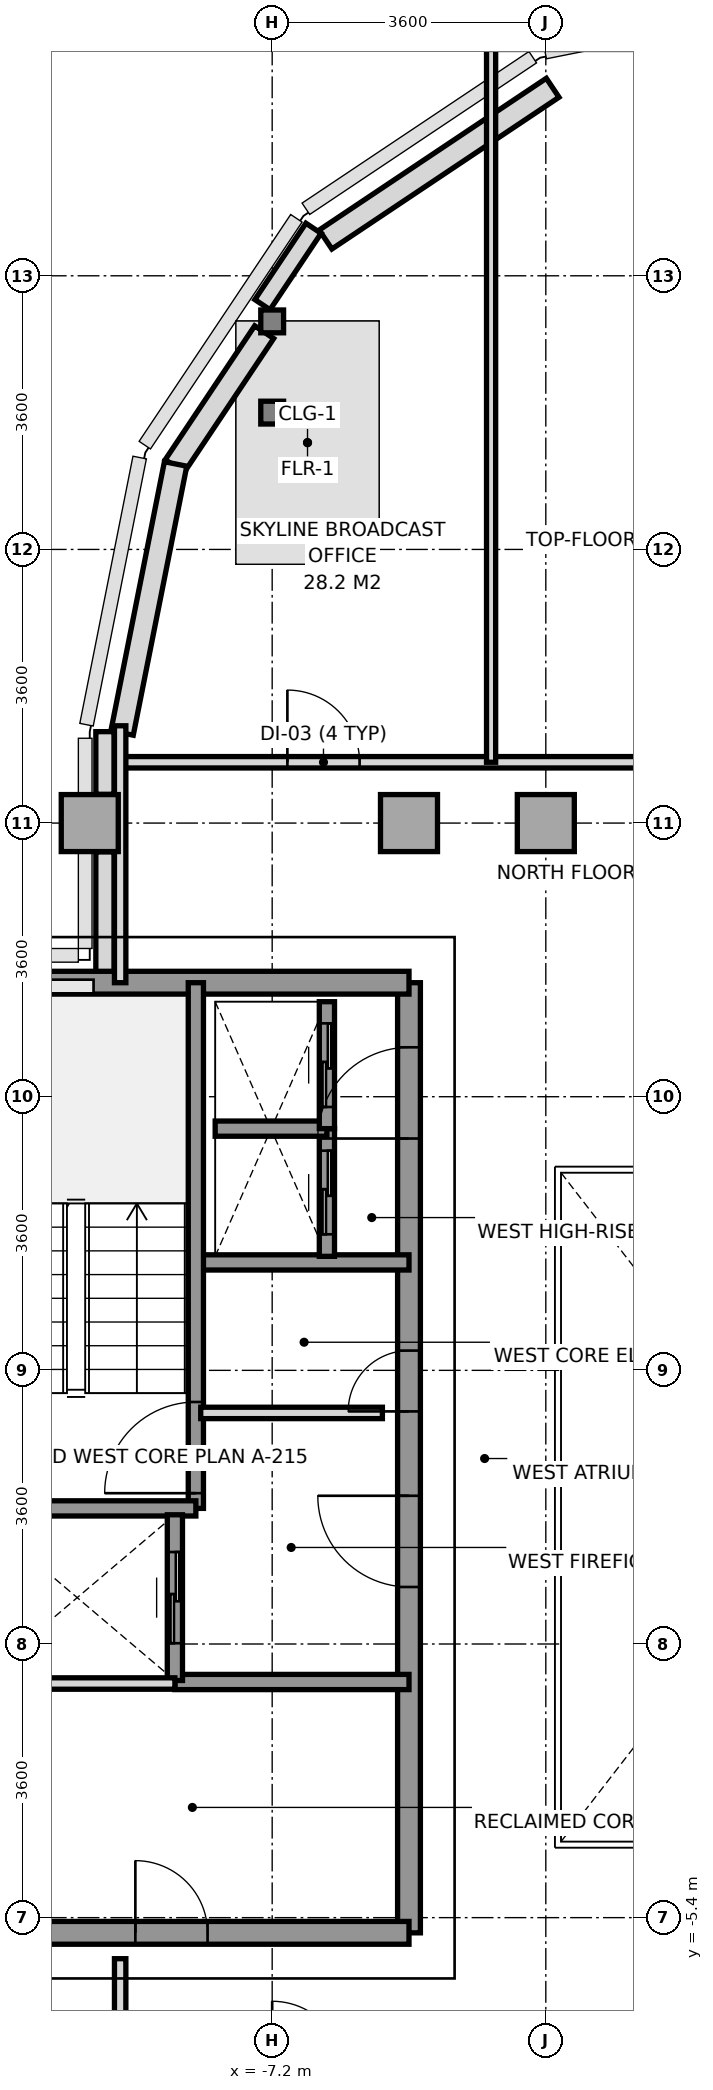
"""IFC4 building model, lengths in metres.
Left out: names, types, materials, properties, quantities, classifications, styles, units other than length and angle.
Written with IfcOpenShell. Run it as: python <this file> out.ifc"""

import sys

from ifc_helpers import new_model, si_unit, direction, frame, frame_2d, origin, origin_2d, place, context, subcontext, project, spatial, rectangle, i_section, extrude, source, transform, mapped, element, fill, save


model = new_model("IFC4")
c1 = context("Model", 3, precision=1e-05, world=origin(), true_north=direction((0.0, 1.0)))
c2 = subcontext(c1, "Body", "Model", "MODEL_VIEW")
j1 = project(units=[si_unit("LENGTHUNIT", "METRE"), si_unit("PLANEANGLEUNIT", "RADIAN")], contexts=[c1])
p1 = place(None, origin())
s1 = spatial("IfcSite", under=j1, at=p1, CompositionType="ELEMENT")
p2 = place(p1, origin())
s2 = spatial("IfcBuilding", under=s1, at=p2, CompositionType="ELEMENT")
p3 = place(p2, frame((0.0, 0.0, 268.4)))
s3 = spatial("IfcBuildingStorey", under=s2, at=p3, CompositionType="ELEMENT", Elevation=268.4)
m1 = source(origin(), c2, "Body", "SweptSolid", [
    extrude(rectangle(XDim=0.75, YDim=0.75, at=origin_2d()), origin(), (0.0, 0.0, 1.0), 2.96),
])
p4 = place(p3, frame((-9.6, 9.0, 0.0), z_axis=(0.0, 0.0, 1.0), x_axis=(1.0, 0.0, 0.0)))
e1 = element("IfcColumn", 1, at=p4, inside=s3, PredefinedType="COLUMN", context=c2, shape_type="MappedRepresentation", body=[
    mapped(m1, transform((0.0, 0.0, 0.0), x_axis=(1.0, 0.0, 0.0), y_axis=(0.0, 1.0, 0.0), z_axis=(0.0, 0.0, 1.0), scale=1.0)),
])
m2 = source(origin(), c2, "Body", "SweptSolid", [
    extrude(i_section(OverallWidth=0.3, OverallDepth=0.3, WebThickness=0.011, FlangeThickness=0.019, at=origin_2d()), origin(), (0.0, 0.0, 1.0), 2.96),
])
for number, where, z_axis, x_axis in (
    (2, (-7.2, 14.4, 0.0), (0.0, 0.0, 1.0), (1.0, 0.0, 0.0)),
    (3, (-7.2, 15.6, 0.0), (0.0, 0.0, 1.0), (1.0, 0.0, 0.0)),
):
    element("IfcColumn", number, at=place(p3, frame(where, z_axis=z_axis, x_axis=x_axis)), inside=s3, PredefinedType="COLUMN", context=c2, shape_type="MappedRepresentation", body=[
        mapped(m2, transform((0.0, 0.0, 0.0), x_axis=(1.0, 0.0, 0.0), y_axis=(0.0, 1.0, 0.0), z_axis=(0.0, 0.0, 1.0), scale=1.0)),
    ])
for number, where, z_axis, x_axis in (
    (4, (-5.4, 9.0, 0.0), (0.0, 0.0, 1.0), (1.0, 0.0, 0.0)),
    (5, (-3.6, 9.0, 0.0), (0.0, 0.0, 1.0), (1.0, 0.0, 0.0)),
):
    element("IfcColumn", number, at=place(p3, frame(where, z_axis=z_axis, x_axis=x_axis)), inside=s3, PredefinedType="COLUMN", context=c2, shape_type="MappedRepresentation", body=[
        mapped(m1, transform((0.0, 0.0, 0.0), x_axis=(1.0, 0.0, 0.0), y_axis=(0.0, 1.0, 0.0), z_axis=(0.0, 0.0, 1.0), scale=1.0)),
    ])
p5 = place(p3, frame((-3.51, 18.674, 0.0), z_axis=(0.0, 0.0, 1.0), x_axis=(-0.831443568068, -0.555609208993, 0.0)))
e6 = element("IfcWall", 6, at=p5, inside=s3, PredefinedType="SOLIDWALL", context=c2, shape_type="SweptSolid", body=[
    extrude(rectangle(XDim=3.594, YDim=0.3, at=frame_2d((1.797, 0.0))), origin(), (0.0, 0.0, 1.0), 2.96),
])
p6 = place(p3, frame((-7.305, 15.458, 0.0), z_axis=(0.0, 0.0, 1.0), x_axis=(-0.555604299396, -0.831446848868, 0.0)))
e7 = element("IfcWall", 7, at=p6, inside=s3, PredefinedType="SOLIDWALL", context=c2, shape_type="SweptSolid", body=[
    extrude(rectangle(XDim=2.118, YDim=0.3, at=frame_2d((1.059, 0.0))), origin(), (0.0, 0.0, 1.0), 2.56),
])
p7 = place(p3, frame((-8.471, 13.725, 0.0), z_axis=(0.0, 0.0, 1.0), x_axis=(-0.195114232679, -0.980780523974, 0.0)))
e8 = element("IfcWall", 8, at=p7, inside=s3, PredefinedType="SOLIDWALL", context=c2, shape_type="SweptSolid", body=[
    extrude(rectangle(XDim=3.609, YDim=0.3, at=frame_2d((1.804, 0.0))), origin(), (0.0, 0.0, 1.0), 2.96),
])
p8 = place(p3, frame((-9.4, 6.953, 0.0), z_axis=(0.0, 0.0, 1.0), x_axis=(0.0, 1.0, 0.0)))
e9 = element("IfcWall", 9, at=p8, inside=s3, PredefinedType="PARAPET", context=c2, shape_type="SweptSolid", body=[
    extrude(rectangle(XDim=1.669, YDim=0.24, at=frame_2d((0.834, 0.0))), origin(), (0.0, 0.0, 1.0), 1.15),
])
p9 = place(p3, frame((-9.4, 9.378, 0.0), z_axis=(0.0, 0.0, 1.0), x_axis=(0.0, 1.0, 0.0)))
e10 = element("IfcWall", 10, at=p9, inside=s3, PredefinedType="PARAPET", context=c2, shape_type="SweptSolid", body=[
    extrude(rectangle(XDim=0.825, YDim=0.24, at=frame_2d((0.413, 0.0))), origin(), (0.0, 0.0, 1.0), 1.15),
])
p10 = place(p3, frame((-7.328, 15.82, 0.0), z_axis=(0.0, 0.0, 1.0), x_axis=(0.555585388542, 0.831459485506, 0.0)))
e11 = element("IfcWall", 11, at=p10, inside=s3, PredefinedType="PARAPET", context=c2, shape_type="SweptSolid", body=[
    extrude(rectangle(XDim=1.209, YDim=0.24, at=frame_2d((0.604, 0.0))), origin(), (0.0, 0.0, 1.0), 1.15),
])
p11 = place(p3, frame((-5.4, -5.6, 0.0), z_axis=(0.0, 0.0, 1.0), x_axis=(0.0, 1.0, 0.0)))
e12 = element("IfcWall", 12, at=p11, inside=s3, PredefinedType="SHEAR", context=c2, shape_type="SweptSolid", body=[
    extrude(rectangle(XDim=12.5, YDim=0.3, at=frame_2d((6.25, 0.0))), origin(), (0.0, 0.0, 1.0), 2.96),
])
p12 = place(p11, frame((4.55, 0.0, 0.0)))
e13 = element("IfcOpeningElement", 13, at=p12, cuts=e12, PredefinedType="OPENING", context=c2, shape_type="SweptSolid", body=[
    extrude(rectangle(XDim=1.2, YDim=2.2, at=frame_2d((0.6, 1.1))), frame((0.0, 0.16, 0.0), z_axis=(0.0, -1.0, 0.0), x_axis=(1.0, 0.0, 0.0)), (0.0, 0.0, 1.0), 0.32),
])
p13 = place(p11, frame((10.45, 0.0, 0.0)))
e14 = element("IfcOpeningElement", 14, at=p13, cuts=e12, PredefinedType="OPENING", context=c2, shape_type="SweptSolid", body=[
    extrude(rectangle(XDim=1.2, YDim=2.2, at=frame_2d((0.6, 1.1))), frame((0.0, 0.16, 0.0), z_axis=(0.0, -1.0, 0.0), x_axis=(1.0, 0.0, 0.0)), (0.0, 0.0, 1.0), 0.32),
])
p14 = place(p11, frame((6.86, 0.0, 0.0)))
e15 = element("IfcOpeningElement", 15, at=p14, cuts=e12, PredefinedType="OPENING", context=c2, shape_type="SweptSolid", body=[
    extrude(rectangle(XDim=0.8, YDim=2.1, at=frame_2d((0.4, 1.05))), frame((0.0, 0.16, 0.0), z_axis=(0.0, -1.0, 0.0), x_axis=(1.0, 0.0, 0.0)), (0.0, 0.0, 1.0), 0.32),
])
p15 = place(p3, frame((-11.356, 6.9, 0.0), z_axis=(0.0, 0.0, 1.0), x_axis=(1.0, 0.0, 0.0)))
e16 = element("IfcWall", 16, at=p15, inside=s3, PredefinedType="SHEAR", context=c2, shape_type="SweptSolid", body=[
    extrude(rectangle(XDim=5.956, YDim=0.3, at=frame_2d((2.978, 0.0))), origin(), (0.0, 0.0, 1.0), 2.96),
])
p16 = place(p3, frame((-13.2, -5.6, 0.0), z_axis=(0.0, 0.0, 1.0), x_axis=(1.0, 0.0, 0.0)))
e17 = element("IfcWall", 17, at=p16, inside=s3, PredefinedType="SHEAR", context=c2, shape_type="SweptSolid", body=[
    extrude(rectangle(XDim=7.8, YDim=0.3, at=frame_2d((3.9, 0.0))), origin(), (0.0, 0.0, 1.0), 2.96),
])
p17 = place(p16, frame((0.65, 0.0, 0.0)))
e18 = element("IfcOpeningElement", 18, at=p17, cuts=e17, PredefinedType="OPENING", context=c2, shape_type="SweptSolid", body=[
    extrude(rectangle(XDim=0.8, YDim=2.1, at=frame_2d((0.4, 1.05))), frame((0.0, 0.16, 0.0), z_axis=(0.0, -1.0, 0.0), x_axis=(1.0, 0.0, 0.0)), (0.0, 0.0, 1.0), 0.32),
])
p18 = place(p16, frame((4.2, 0.0, 0.0)))
e19 = element("IfcOpeningElement", 19, at=p18, cuts=e17, PredefinedType="OPENING", context=c2, shape_type="SweptSolid", body=[
    extrude(rectangle(XDim=0.95, YDim=2.15, at=frame_2d((0.475, 1.075))), frame((0.0, 0.16, 0.0), z_axis=(0.0, -1.0, 0.0), x_axis=(1.0, 0.0, 0.0)), (0.0, 0.0, 1.0), 0.32),
])
p19 = place(p3, frame((-8.18, 3.22, 0.0), z_axis=(0.0, 0.0, 1.0), x_axis=(1.0, 0.0, 0.0)))
e20 = element("IfcWall", 20, at=p19, inside=s3, PredefinedType="SOLIDWALL", context=c2, shape_type="SweptSolid", body=[
    extrude(rectangle(XDim=2.78, YDim=0.2, at=frame_2d((1.39, 0.0))), origin(), (0.0, 0.0, 1.0), 2.96),
])
p20 = place(p3, frame((-8.48, -2.3, 0.0), z_axis=(0.0, 0.0, 1.0), x_axis=(1.0, 0.0, 0.0)))
e21 = element("IfcWall", 21, at=p20, inside=s3, PredefinedType="SOLIDWALL", context=c2, shape_type="SweptSolid", body=[
    extrude(rectangle(XDim=3.08, YDim=0.2, at=frame_2d((1.54, 0.0))), origin(), (0.0, 0.0, 1.0), 2.96),
])
p21 = place(p3, frame((-8.204, -0.016, 0.0), z_axis=(0.0, 0.0, 1.0), x_axis=(0.0, 1.0, 0.0)))
e22 = element("IfcWall", 22, at=p21, inside=s3, PredefinedType="SOLIDWALL", context=c2, shape_type="SweptSolid", body=[
    extrude(rectangle(XDim=6.916, YDim=0.2, at=frame_2d((3.458, 0.0))), origin(), (0.0, 0.0, 1.0), 2.96),
])
p22 = place(p21, frame((0.2, 0.0, 0.0)))
e23 = element("IfcOpeningElement", 23, at=p22, cuts=e22, PredefinedType="OPENING", context=c2, shape_type="SweptSolid", body=[
    extrude(rectangle(XDim=1.2, YDim=2.2, at=frame_2d((0.6, 1.1))), frame((0.0, 0.11, 0.0), z_axis=(0.0, -1.0, 0.0), x_axis=(1.0, 0.0, 0.0)), (0.0, 0.0, 1.0), 0.22),
])
p23 = place(p3, frame((-11.356, -0.016, 0.0), z_axis=(0.0, 0.0, 1.0), x_axis=(1.0, 0.0, 0.0)))
e24 = element("IfcWall", 24, at=p23, inside=s3, PredefinedType="SOLIDWALL", context=c2, shape_type="SweptSolid", body=[
    extrude(rectangle(XDim=3.152, YDim=0.2, at=frame_2d((1.576, 0.0))), origin(), (0.0, 0.0, 1.0), 2.96),
])
p24 = place(p3, frame((-8.48, -2.28, 0.0), z_axis=(0.0, 0.0, 1.0), x_axis=(0.0, 1.0, 0.0)))
e25 = element("IfcWall", 25, at=p24, inside=s3, PredefinedType="SOLIDWALL", context=c2, shape_type="SweptSolid", body=[
    extrude(rectangle(XDim=2.18, YDim=0.2, at=frame_2d((1.09, 0.0))), origin(), (0.0, 0.0, 1.0), 2.96),
])
p25 = place(p24, frame((0.49, 0.0, 0.0)))
e26 = element("IfcOpeningElement", 26, at=p25, cuts=e25, PredefinedType="OPENING", context=c2, shape_type="SweptSolid", body=[
    extrude(rectangle(XDim=1.2, YDim=2.2, at=frame_2d((0.6, 1.1))), frame((0.0, 0.11, 0.0), z_axis=(0.0, -1.0, 0.0), x_axis=(1.0, 0.0, 0.0)), (0.0, 0.0, 1.0), 0.22),
])
p26 = place(p3, frame((-6.48, 3.3, 0.0), z_axis=(0.0, 0.0, 1.0), x_axis=(0.0, 1.0, 0.0)))
e27 = element("IfcWall", 27, at=p26, inside=s3, PredefinedType="SOLIDWALL", context=c2, shape_type="SweptSolid", body=[
    extrude(rectangle(XDim=1.68, YDim=0.2, at=frame_2d((0.84, 0.0))), origin(), (0.0, 0.0, 1.0), 2.96),
])
p27 = place(p26, frame((0.29, 0.0, 0.0)))
e28 = element("IfcOpeningElement", 28, at=p27, cuts=e27, PredefinedType="OPENING", context=c2, shape_type="SweptSolid", body=[
    extrude(rectangle(XDim=1.1, YDim=2.2, at=frame_2d((0.55, 1.1))), frame((0.0, 0.11, 0.0), z_axis=(0.0, -1.0, 0.0), x_axis=(1.0, 0.0, 0.0)), (0.0, 0.0, 1.0), 0.22),
])
p28 = place(p3, frame((-7.95, 4.98, 0.0), z_axis=(0.0, 0.0, 1.0), x_axis=(1.0, 0.0, 0.0)))
e29 = element("IfcWall", 29, at=p28, inside=s3, PredefinedType="SOLIDWALL", context=c2, shape_type="SweptSolid", body=[
    extrude(rectangle(XDim=1.47, YDim=0.2, at=frame_2d((0.735, 0.0))), origin(), (0.0, 0.0, 1.0), 2.96),
])
p29 = place(p3, frame((-6.48, 4.98, 0.0), z_axis=(0.0, 0.0, 1.0), x_axis=(0.0, 1.0, 0.0)))
e30 = element("IfcWall", 30, at=p29, inside=s3, PredefinedType="SOLIDWALL", context=c2, shape_type="SweptSolid", body=[
    extrude(rectangle(XDim=1.67, YDim=0.2, at=frame_2d((0.835, 0.0))), origin(), (0.0, 0.0, 1.0), 2.96),
])
p30 = place(p29, frame((0.285, 0.0, 0.0)))
e31 = element("IfcOpeningElement", 31, at=p30, cuts=e30, PredefinedType="OPENING", context=c2, shape_type="SweptSolid", body=[
    extrude(rectangle(XDim=1.1, YDim=2.2, at=frame_2d((0.55, 1.1))), frame((0.0, 0.11, 0.0), z_axis=(0.0, -1.0, 0.0), x_axis=(1.0, 0.0, 0.0)), (0.0, 0.0, 1.0), 0.22),
])
p31 = place(p3, frame((-8.14, 1.24, 0.0), z_axis=(0.0, 0.0, 1.0), x_axis=(1.0, 0.0, 0.0)))
e32 = element("IfcWall", 32, at=p31, inside=s3, PredefinedType="PARTITIONING", context=c2, shape_type="SweptSolid", body=[
    extrude(rectangle(XDim=2.39, YDim=0.15, at=frame_2d((1.195, 0.0))), origin(), (0.0, 0.0, 1.0), 2.96),
])
p32 = place(p3, frame((-11.04, -2.32, 0.0), z_axis=(0.0, 0.0, 1.0), x_axis=(1.0, 0.0, 0.0)))
e33 = element("IfcWall", 33, at=p32, inside=s3, PredefinedType="PARTITIONING", context=c2, shape_type="SweptSolid", body=[
    extrude(rectangle(XDim=2.56, YDim=0.15, at=frame_2d((1.28, 0.0))), origin(), (0.0, 0.0, 1.0), 2.96),
])
p33 = place(p3, frame((-9.2, 9.8, 0.0), z_axis=(0.0, 0.0, 1.0), x_axis=(1.0, 0.0, 0.0)))
e34 = element("IfcWall", 34, at=p33, inside=s3, PredefinedType="PARTITIONING", context=c2, shape_type="SweptSolid", body=[
    extrude(rectangle(XDim=18.4, YDim=0.15, at=frame_2d((9.2, 0.0))), origin(), (0.0, 0.0, 1.0), 2.96),
])
p34 = place(p33, frame((2.2, 0.0, 0.0)))
e35 = element("IfcOpeningElement", 35, at=p34, cuts=e34, PredefinedType="OPENING", context=c2, shape_type="SweptSolid", body=[
    extrude(rectangle(XDim=0.95, YDim=2.15, at=frame_2d((0.475, 1.075))), frame((0.0, 0.085, 0.0), z_axis=(0.0, -1.0, 0.0), x_axis=(1.0, 0.0, 0.0)), (0.0, 0.0, 1.0), 0.17),
])
p35 = place(p33, frame((8.8, 0.0, 0.0)))
e36 = element("IfcOpeningElement", 36, at=p35, cuts=e34, PredefinedType="OPENING", context=c2, shape_type="SweptSolid", body=[
    extrude(rectangle(XDim=1.1, YDim=2.2, at=frame_2d((0.55, 1.1))), frame((0.0, 0.085, 0.0), z_axis=(0.0, -1.0, 0.0), x_axis=(1.0, 0.0, 0.0)), (0.0, 0.0, 1.0), 0.17),
])
p36 = place(p33, frame((15.2, 0.0, 0.0)))
e37 = element("IfcOpeningElement", 37, at=p36, cuts=e34, PredefinedType="OPENING", context=c2, shape_type="SweptSolid", body=[
    extrude(rectangle(XDim=0.95, YDim=2.15, at=frame_2d((0.475, 1.075))), frame((0.0, 0.085, 0.0), z_axis=(0.0, -1.0, 0.0), x_axis=(1.0, 0.0, 0.0)), (0.0, 0.0, 1.0), 0.17),
])
p37 = place(p3, frame((-9.2, 6.9, 0.0), z_axis=(0.0, 0.0, 1.0), x_axis=(0.0, 1.0, 0.0)))
e38 = element("IfcWall", 38, at=p37, inside=s3, PredefinedType="PARTITIONING", context=c2, shape_type="SweptSolid", body=[
    extrude(rectangle(XDim=3.38, YDim=0.15, at=frame_2d((1.69, 0.0))), origin(), (0.0, 0.0, 1.0), 2.56),
])
p38 = place(p3, frame((-4.32, 9.8, 0.0), z_axis=(0.0, 0.0, 1.0), x_axis=(0.0, 1.0, 0.0)))
e39 = element("IfcWall", 39, at=p38, inside=s3, PredefinedType="PARTITIONING", context=c2, shape_type="SweptSolid", body=[
    extrude(rectangle(XDim=9.45, YDim=0.12, at=frame_2d((4.725, 0.0))), origin(), (0.0, 0.0, 1.0), 2.56),
])
p39 = place(p3, frame((-9.2, -10.28, 0.0), z_axis=(0.0, 0.0, 1.0), x_axis=(0.0, 1.0, 0.0)))
e40 = element("IfcWall", 40, at=p39, inside=s3, PredefinedType="PARTITIONING", context=c2, shape_type="SweptSolid", body=[
    extrude(rectangle(XDim=4.34, YDim=0.15, at=frame_2d((2.17, 0.0))), origin(), (0.0, 0.0, 1.0), 2.56),
])
m3 = source(origin(), c2, "Body", "SweptSolid", [
    extrude(rectangle(XDim=1.2, YDim=2.2, at=frame_2d((0.6, 1.1))), frame((0.0, 0.025, 0.0), z_axis=(0.0, -1.0, 0.0), x_axis=(1.0, 0.0, 0.0)), (0.0, 0.0, 1.0), 0.05),
])
p40 = place(p22, origin())
e41 = element("IfcDoor", 41, at=p40, inside=s3, OperationType="SINGLE_SWING_LEFT", PredefinedType="DOOR", context=c2, shape_type="MappedRepresentation", body=[
    mapped(m3, transform((0.0, 0.0, 0.0), x_axis=(1.0, 0.0, 0.0), y_axis=(0.0, 1.0, 0.0), z_axis=(0.0, 0.0, 1.0), scale=1.0)),
])
fill(e23, e41)
p41 = place(p12, origin())
e42 = element("IfcDoor", 42, at=p41, inside=s3, OperationType="SINGLE_SWING_RIGHT", PredefinedType="DOOR", context=c2, shape_type="MappedRepresentation", body=[
    mapped(m3, transform((0.0, 0.0, 0.0), x_axis=(1.0, 0.0, 0.0), y_axis=(0.0, 1.0, 0.0), z_axis=(0.0, 0.0, 1.0), scale=1.0)),
])
fill(e13, e42)
p42 = place(p13, origin())
e43 = element("IfcDoor", 43, at=p42, inside=s3, OperationType="SINGLE_SWING_LEFT", PredefinedType="DOOR", context=c2, shape_type="MappedRepresentation", body=[
    mapped(m3, transform((0.0, 0.0, 0.0), x_axis=(1.0, 0.0, 0.0), y_axis=(0.0, 1.0, 0.0), z_axis=(0.0, 0.0, 1.0), scale=1.0)),
])
fill(e14, e43)
m4 = source(origin(), c2, "Body", "SweptSolid", [
    extrude(rectangle(XDim=0.8, YDim=2.1, at=frame_2d((0.4, 1.05))), frame((0.0, 0.025, 0.0), z_axis=(0.0, -1.0, 0.0), x_axis=(1.0, 0.0, 0.0)), (0.0, 0.0, 1.0), 0.05),
])
p43 = place(p14, origin())
e44 = element("IfcDoor", 44, at=p43, inside=s3, OperationType="SINGLE_SWING_LEFT", PredefinedType="DOOR", context=c2, shape_type="MappedRepresentation", body=[
    mapped(m4, transform((0.0, 0.0, 0.0), x_axis=(1.0, 0.0, 0.0), y_axis=(0.0, 1.0, 0.0), z_axis=(0.0, 0.0, 1.0), scale=1.0)),
])
fill(e15, e44)
m5 = source(origin(), c2, "Body", "SweptSolid", [
    extrude(rectangle(XDim=0.95, YDim=2.15, at=frame_2d((0.475, 1.075))), frame((0.0, 0.025, 0.0), z_axis=(0.0, -1.0, 0.0), x_axis=(1.0, 0.0, 0.0)), (0.0, 0.0, 1.0), 0.05),
])
p44 = place(p18, origin())
e45 = element("IfcDoor", 45, at=p44, inside=s3, OperationType="SINGLE_SWING_LEFT", PredefinedType="DOOR", context=c2, shape_type="MappedRepresentation", body=[
    mapped(m5, transform((0.0, 0.0, 0.0), x_axis=(1.0, 0.0, 0.0), y_axis=(0.0, 1.0, 0.0), z_axis=(0.0, 0.0, 1.0), scale=1.0)),
])
fill(e19, e45)
p45 = place(p25, origin())
e46 = element("IfcDoor", 46, at=p45, inside=s3, OperationType="SLIDING_TO_RIGHT", PredefinedType="DOOR", context=c2, shape_type="MappedRepresentation", body=[
    mapped(m3, transform((0.0, 0.0, 0.0), x_axis=(1.0, 0.0, 0.0), y_axis=(0.0, 1.0, 0.0), z_axis=(0.0, 0.0, 1.0), scale=1.0)),
])
fill(e26, e46)
m6 = source(origin(), c2, "Body", "SweptSolid", [
    extrude(rectangle(XDim=1.1, YDim=2.2, at=frame_2d((0.55, 1.1))), frame((0.0, 0.025, 0.0), z_axis=(0.0, -1.0, 0.0), x_axis=(1.0, 0.0, 0.0)), (0.0, 0.0, 1.0), 0.05),
])
p46 = place(p27, origin())
e47 = element("IfcDoor", 47, at=p46, inside=s3, OperationType="SLIDING_TO_LEFT", PredefinedType="DOOR", context=c2, shape_type="MappedRepresentation", body=[
    mapped(m6, transform((0.0, 0.0, 0.0), x_axis=(1.0, 0.0, 0.0), y_axis=(0.0, 1.0, 0.0), z_axis=(0.0, 0.0, 1.0), scale=1.0)),
])
fill(e28, e47)
p47 = place(p30, origin())
e48 = element("IfcDoor", 48, at=p47, inside=s3, OperationType="SLIDING_TO_LEFT", PredefinedType="DOOR", context=c2, shape_type="MappedRepresentation", body=[
    mapped(m6, transform((0.0, 0.0, 0.0), x_axis=(1.0, 0.0, 0.0), y_axis=(0.0, 1.0, 0.0), z_axis=(0.0, 0.0, 1.0), scale=1.0)),
])
fill(e31, e48)
p48 = place(p34, origin())
e49 = element("IfcDoor", 49, at=p48, inside=s3, OperationType="SINGLE_SWING_LEFT", PredefinedType="DOOR", context=c2, shape_type="MappedRepresentation", body=[
    mapped(m5, transform((0.0, 0.0, 0.0), x_axis=(1.0, 0.0, 0.0), y_axis=(0.0, 1.0, 0.0), z_axis=(0.0, 0.0, 1.0), scale=1.0)),
])
fill(e35, e49)
save(model, sys.argv[1])
